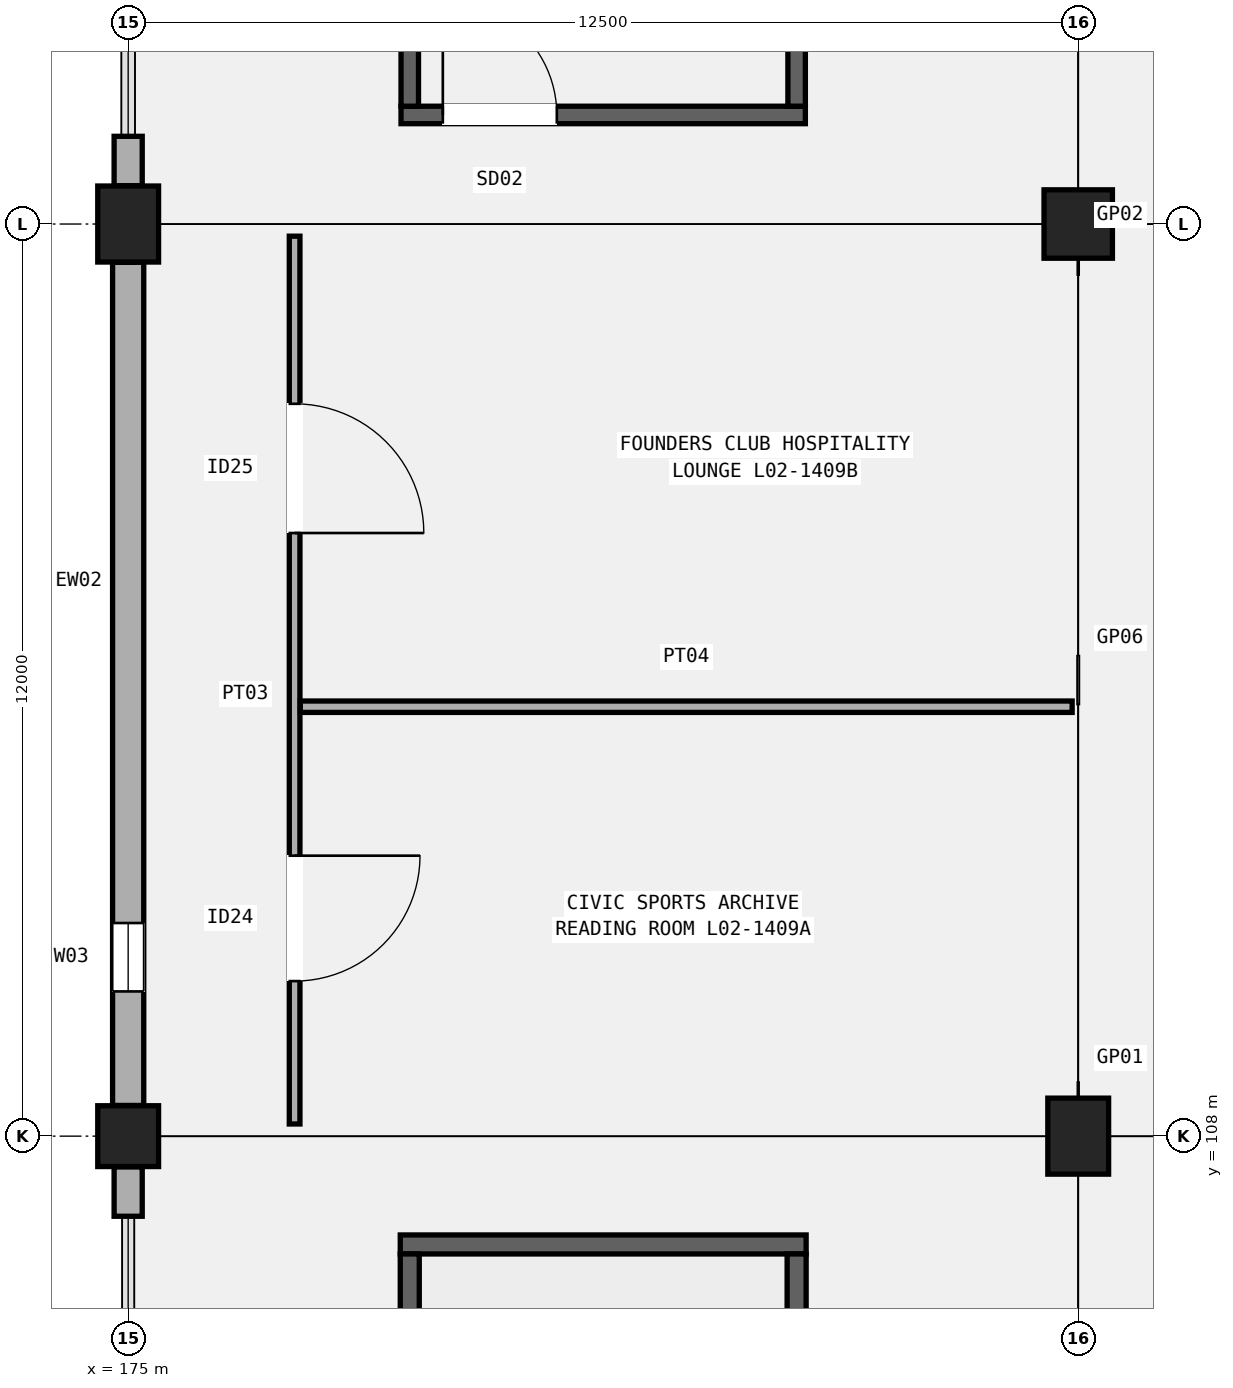
"""IFC4 building model, lengths in metres.
Left out: names, types, materials, properties, quantities, classifications, styles, units other than length and angle.
Written with IfcOpenShell. Run it as: python <this file> out.ifc"""

import sys

from ifc_helpers import new_model, si_unit, direction, frame, frame_2d, origin, origin_2d, place, context, subcontext, project, spatial, rectangle, extrude, element, fill, save


model = new_model("IFC4")
c1 = context("Model", 3, precision=1e-05, world=origin(), true_north=direction((0.0, 1.0)))
c2 = subcontext(c1, "Body", "Model", "MODEL_VIEW")
j1 = project(units=[si_unit("LENGTHUNIT", "METRE"), si_unit("PLANEANGLEUNIT", "RADIAN")], contexts=[c1])
p1 = place(None, origin())
s1 = spatial("IfcSite", under=j1, at=p1, CompositionType="ELEMENT")
p2 = place(p1, origin())
s2 = spatial("IfcBuilding", under=s1, at=p2, CompositionType="ELEMENT")
p3 = place(p2, frame((0.0, 0.0, 10.2)))
s3 = spatial("IfcBuildingStorey", under=s2, at=p3, CompositionType="ELEMENT", Elevation=10.2)
p4 = place(p3, frame((175.0, 108.0, 0.0), z_axis=(0.0, 0.0, 1.0), x_axis=(1.0, 0.0, 0.0)))
e1 = element("IfcColumn", 1, at=p4, inside=s3, PredefinedType="COLUMN", context=c2, shape_type="SweptSolid", body=[
    extrude(rectangle(XDim=0.8, YDim=0.8, at=origin_2d()), origin(), (0.0, 0.0, 1.0), 5.1),
])
for number, where, z_axis, x_axis in (
    (2, (175.0, 120.0, 0.0), (0.0, 0.0, 1.0), (1.0, 0.0, 0.0)),
    (3, (187.5, 108.0, 0.0), (0.0, 0.0, 1.0), (1.0, 0.0, 0.0)),
):
    element("IfcColumn", number, at=place(p3, frame(where, z_axis=z_axis, x_axis=x_axis)), inside=s3, PredefinedType="COLUMN", context=c2, shape_type="SweptSolid", body=[
        extrude(rectangle(XDim=0.8, YDim=1.0, at=origin_2d()), origin(), (0.0, 0.0, 1.0), 5.1),
    ])
p5 = place(p3, frame((187.5, 120.0, 0.0), z_axis=(0.0, 0.0, 1.0), x_axis=(1.0, 0.0, 0.0)))
e4 = element("IfcColumn", 4, at=p5, inside=s3, PredefinedType="COLUMN", context=c2, shape_type="SweptSolid", body=[
    extrude(rectangle(XDim=0.9, YDim=0.9, at=origin_2d()), origin(), (0.0, 0.0, 1.0), 5.1),
])
p6 = place(p3, frame((175.0, 106.946, 0.0), z_axis=(0.0, 0.0, 1.0), x_axis=(0.0, 1.0, 0.0)))
e5 = element("IfcWall", 5, at=p6, inside=s3, PredefinedType="SOLIDWALL", context=c2, shape_type="SweptSolid", body=[
    extrude(rectangle(XDim=0.65, YDim=0.37, at=frame_2d((0.325, 0.0))), origin(), (0.0, 0.0, 1.0), 4.12),
])
p7 = place(p3, frame((175.0, 108.404, 0.0), z_axis=(0.0, 0.0, 1.0), x_axis=(0.0, 1.0, 0.0)))
e6 = element("IfcWall", 6, at=p7, inside=s3, PredefinedType="SOLIDWALL", context=c2, shape_type="SweptSolid", body=[
    extrude(rectangle(XDim=11.092, YDim=0.41, at=frame_2d((5.546, 0.0))), origin(), (0.0, 0.0, 1.0), 4.232),
])
p8 = place(p7, frame((1.5, 0.0, 0.95)))
e7 = element("IfcOpeningElement", 7, at=p8, cuts=e6, PredefinedType="OPENING", context=c2, shape_type="SweptSolid", body=[
    extrude(rectangle(XDim=0.9, YDim=2.7, at=frame_2d((0.45, 1.35))), frame((0.0, 0.215, 0.0), z_axis=(0.0, -1.0, 0.0), x_axis=(1.0, 0.0, 0.0)), (0.0, 0.0, 1.0), 0.43),
])
p9 = place(p3, frame((175.0, 120.504, 0.0), z_axis=(0.0, 0.0, 1.0), x_axis=(0.0, 1.0, 0.0)))
e8 = element("IfcWall", 8, at=p9, inside=s3, PredefinedType="SOLIDWALL", context=c2, shape_type="SweptSolid", body=[
    extrude(rectangle(XDim=0.65, YDim=0.37, at=frame_2d((0.325, 0.0))), origin(), (0.0, 0.0, 1.0), 4.02),
])
p10 = place(p3, frame((178.58, 106.575, 0.0), z_axis=(0.0, 0.0, 1.0), x_axis=(1.0, 0.0, 0.0)))
e9 = element("IfcWall", 9, at=p10, inside=s3, PredefinedType="SHEAR", context=c2, shape_type="SweptSolid", body=[
    extrude(rectangle(XDim=5.34, YDim=0.25, at=frame_2d((2.67, 0.0))), origin(), (0.0, 0.0, 1.0), 4.82),
])
for number, where, z_axis, x_axis in (
    (10, (178.705, 97.55, 0.0), (0.0, 0.0, 1.0), (0.0, 1.0, 0.0)),
    (11, (183.795, 97.55, 0.0), (0.0, 0.0, 1.0), (0.0, 1.0, 0.0)),
):
    element("IfcWall", number, at=place(p3, frame(where, z_axis=z_axis, x_axis=x_axis)), inside=s3, PredefinedType="SHEAR", context=c2, shape_type="SweptSolid", body=[
        extrude(rectangle(XDim=8.9, YDim=0.25, at=frame_2d((4.45, 0.0))), origin(), (0.0, 0.0, 1.0), 4.82),
    ])
p11 = place(p3, frame((178.59, 121.435, 0.0), z_axis=(0.0, 0.0, 1.0), x_axis=(1.0, 0.0, 0.0)))
e12 = element("IfcWall", 12, at=p11, inside=s3, PredefinedType="SHEAR", context=c2, shape_type="SweptSolid", body=[
    extrude(rectangle(XDim=5.32, YDim=0.23, at=frame_2d((2.66, 0.0))), origin(), (0.0, 0.0, 1.0), 4.82),
])
p12 = place(p11, frame((0.55, 0.0, 0.0)))
e13 = element("IfcOpeningElement", 13, at=p12, cuts=e12, PredefinedType="OPENING", context=c2, shape_type="SweptSolid", body=[
    extrude(rectangle(XDim=1.5, YDim=2.2, at=frame_2d((0.75, 1.1))), frame((0.0, 0.125, 0.0), z_axis=(0.0, -1.0, 0.0), x_axis=(1.0, 0.0, 0.0)), (0.0, 0.0, 1.0), 0.25),
])
for number, where, z_axis, x_axis in (
    (14, (178.705, 121.55, 0.0), (0.0, 0.0, 1.0), (0.0, 1.0, 0.0)),
    (15, (183.795, 121.55, 0.0), (0.0, 0.0, 1.0), (0.0, 1.0, 0.0)),
):
    element("IfcWall", number, at=place(p3, frame(where, z_axis=z_axis, x_axis=x_axis)), inside=s3, PredefinedType="SHEAR", context=c2, shape_type="SweptSolid", body=[
        extrude(rectangle(XDim=8.9, YDim=0.23, at=frame_2d((4.45, 0.0))), origin(), (0.0, 0.0, 1.0), 4.82),
    ])
p13 = place(p3, frame((177.19, 108.16, 0.0), z_axis=(0.0, 0.0, 1.0), x_axis=(0.0, 1.0, 0.0)))
e16 = element("IfcWall", 16, at=p13, inside=s3, PredefinedType="PARTITIONING", context=c2, shape_type="SweptSolid", body=[
    extrude(rectangle(XDim=11.68, YDim=0.14, at=frame_2d((5.84, 0.0))), origin(), (0.0, 0.0, 1.0), 4.22),
])
p14 = place(p13, frame((3.53, 0.0, 0.0), z_axis=(0.0, 0.0, 1.0), x_axis=(-1.0, 0.0, 0.0)))
e17 = element("IfcOpeningElement", 17, at=p14, cuts=e16, PredefinedType="OPENING", context=c2, shape_type="SweptSolid", body=[
    extrude(rectangle(XDim=1.65, YDim=2.28, at=frame_2d((0.825, 1.14))), frame((0.0, 0.08, 0.0), z_axis=(0.0, -1.0, 0.0), x_axis=(1.0, 0.0, 0.0)), (0.0, 0.0, 1.0), 0.16),
])
p15 = place(p13, frame((9.475, 0.0, 0.0), z_axis=(0.0, 0.0, 1.0), x_axis=(-1.0, 0.0, 0.0)))
e18 = element("IfcOpeningElement", 18, at=p15, cuts=e16, PredefinedType="OPENING", context=c2, shape_type="SweptSolid", body=[
    extrude(rectangle(XDim=1.7, YDim=2.32, at=frame_2d((0.85, 1.16))), frame((0.0, 0.08, 0.0), z_axis=(0.0, -1.0, 0.0), x_axis=(1.0, 0.0, 0.0)), (0.0, 0.0, 1.0), 0.16),
])
p16 = place(p3, frame((177.265, 113.65, 0.0), z_axis=(0.0, 0.0, 1.0), x_axis=(1.0, 0.0, 0.0)))
e19 = element("IfcWall", 19, at=p16, inside=s3, PredefinedType="PARTITIONING", context=c2, shape_type="SweptSolid", body=[
    extrude(rectangle(XDim=10.155, YDim=0.15, at=frame_2d((5.078, 0.0))), origin(), (0.0, 0.0, 1.0), 4.22),
])
p17 = place(p8, origin())
e20 = element("IfcWindow", 20, at=p17, inside=s3, PartitioningType="SINGLE_PANEL", PredefinedType="WINDOW", context=c2, shape_type="SweptSolid", body=[
    extrude(rectangle(XDim=0.9, YDim=2.7, at=frame_2d((0.45, 1.35))), frame((0.0, 0.03, 0.0), z_axis=(0.0, -1.0, 0.0), x_axis=(1.0, 0.0, 0.0)), (0.0, 0.0, 1.0), 0.06),
])
fill(e7, e20)
p18 = place(p12, origin())
e21 = element("IfcDoor", 21, at=p18, inside=s3, OperationType="SINGLE_SWING_LEFT", PredefinedType="DOOR", context=c2, shape_type="SweptSolid", body=[
    extrude(rectangle(XDim=1.5, YDim=2.2, at=frame_2d((0.75, 1.1))), frame((0.0, 0.025, 0.0), z_axis=(0.0, -1.0, 0.0), x_axis=(1.0, 0.0, 0.0)), (0.0, 0.0, 1.0), 0.05),
])
fill(e13, e21)
p19 = place(p14, origin())
e22 = element("IfcDoor", 22, at=p19, inside=s3, OperationType="SINGLE_SWING_LEFT", PredefinedType="DOOR", context=c2, shape_type="SweptSolid", body=[
    extrude(rectangle(XDim=1.65, YDim=2.28, at=frame_2d((0.825, 1.14))), frame((0.0, 0.025, 0.0), z_axis=(0.0, -1.0, 0.0), x_axis=(1.0, 0.0, 0.0)), (0.0, 0.0, 1.0), 0.05),
])
fill(e17, e22)
p20 = place(p15, origin())
e23 = element("IfcDoor", 23, at=p20, inside=s3, OperationType="SINGLE_SWING_RIGHT", PredefinedType="DOOR", context=c2, shape_type="SweptSolid", body=[
    extrude(rectangle(XDim=1.7, YDim=2.32, at=frame_2d((0.85, 1.16))), frame((0.0, 0.025, 0.0), z_axis=(0.0, -1.0, 0.0), x_axis=(1.0, 0.0, 0.0)), (0.0, 0.0, 1.0), 0.05),
])
fill(e18, e23)
save(model, sys.argv[1])
